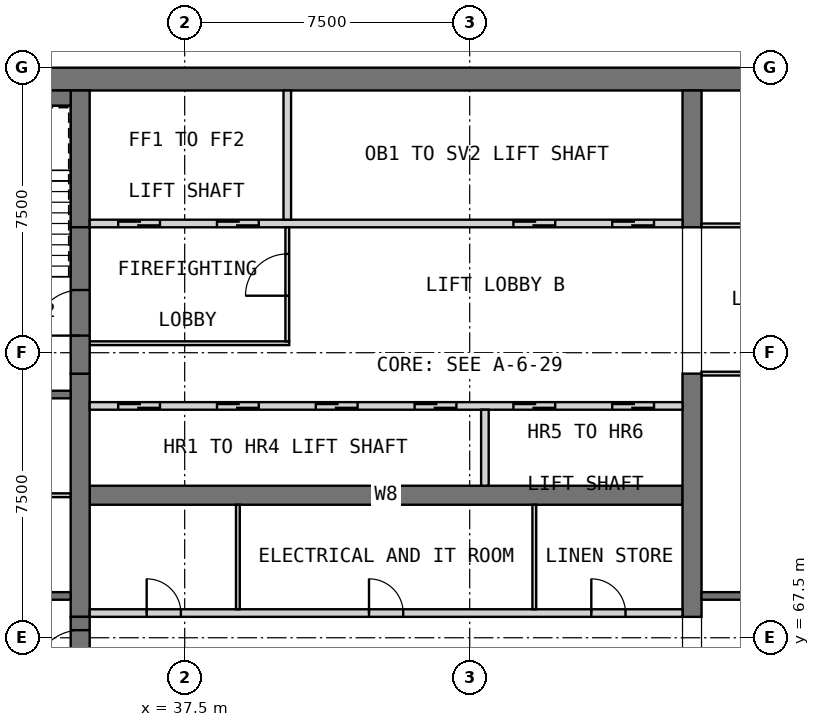
"""IFC4 building model, lengths in metres.
Left out: names, types, materials, properties, quantities, classifications, styles, units other than length and angle.
Written with IfcOpenShell. Run it as: python <this file> out.ifc"""

import sys

from ifc_helpers import new_model, si_unit, direction, frame, frame_2d, origin, place, context, subcontext, project, spatial, rectangle, extrude, element, fill, save


model = new_model("IFC4")
c1 = context("Model", 3, precision=1e-05, world=origin(), true_north=direction((0.0, 1.0)))
c2 = subcontext(c1, "Body", "Model", "MODEL_VIEW")
j1 = project(units=[si_unit("LENGTHUNIT", "METRE"), si_unit("PLANEANGLEUNIT", "RADIAN")], contexts=[c1])
p1 = place(None, origin())
s1 = spatial("IfcSite", under=j1, at=p1, CompositionType="ELEMENT")
p2 = place(p1, origin())
s2 = spatial("IfcBuilding", under=s1, at=p2, CompositionType="ELEMENT")
p3 = place(p2, frame((0.0, 0.0, 233.7)))
s3 = spatial("IfcBuildingStorey", under=s2, at=p3, CompositionType="ELEMENT", Elevation=233.7)
p4 = place(p3, frame((30.0, 82.2, 0.0), z_axis=(0.0, 0.0, 1.0), x_axis=(1.0, 0.0, 0.0)))
e1 = element("IfcWall", 1, at=p4, inside=s3, PredefinedType="SHEAR", context=c2, shape_type="SweptSolid", body=[
    extrude(rectangle(XDim=30.0, YDim=0.6, at=frame_2d((15.0, 0.0))), origin(), (0.0, 0.0, 1.0), 3.5),
])
p5 = place(p3, frame((35.0, 71.25, 0.0), z_axis=(0.0, 0.0, 1.0), x_axis=(1.0, 0.0, 0.0)))
e2 = element("IfcWall", 2, at=p5, inside=s3, PredefinedType="SHEAR", context=c2, shape_type="SweptSolid", body=[
    extrude(rectangle(XDim=15.6, YDim=0.5, at=frame_2d((7.8, 0.0))), origin(), (0.0, 0.0, 1.0), 3.5),
])
p6 = place(p3, frame((34.75, 68.05, 0.0), z_axis=(0.0, 0.0, 1.0), x_axis=(0.0, 1.0, 0.0)))
e3 = element("IfcWall", 3, at=p6, inside=s3, PredefinedType="SHEAR", context=c2, shape_type="SweptSolid", body=[
    extrude(rectangle(XDim=6.4, YDim=0.5, at=frame_2d((3.2, 0.0))), origin(), (0.0, 0.0, 1.0), 3.5),
])
p7 = place(p3, frame((34.75, 78.3, 0.0), z_axis=(0.0, 0.0, 1.0), x_axis=(0.0, 1.0, 0.0)))
e4 = element("IfcWall", 4, at=p7, inside=s3, PredefinedType="SHEAR", context=c2, shape_type="SweptSolid", body=[
    extrude(rectangle(XDim=3.6, YDim=0.5, at=frame_2d((1.8, 0.0))), origin(), (0.0, 0.0, 1.0), 3.5),
])
p8 = place(p3, frame((50.85, 68.05, 0.0), z_axis=(0.0, 0.0, 1.0), x_axis=(0.0, 1.0, 0.0)))
e5 = element("IfcWall", 5, at=p8, inside=s3, PredefinedType="SHEAR", context=c2, shape_type="SweptSolid", body=[
    extrude(rectangle(XDim=6.4, YDim=0.5, at=frame_2d((3.2, 0.0))), origin(), (0.0, 0.0, 1.0), 3.5),
])
p9 = place(p3, frame((50.85, 78.3, 0.0), z_axis=(0.0, 0.0, 1.0), x_axis=(0.0, 1.0, 0.0)))
e6 = element("IfcWall", 6, at=p9, inside=s3, PredefinedType="SHEAR", context=c2, shape_type="SweptSolid", body=[
    extrude(rectangle(XDim=3.6, YDim=0.5, at=frame_2d((1.8, 0.0))), origin(), (0.0, 0.0, 1.0), 3.5),
])
p10 = place(p3, frame((35.0, 68.15, 0.0), z_axis=(0.0, 0.0, 1.0), x_axis=(1.0, 0.0, 0.0)))
e7 = element("IfcWall", 7, at=p10, inside=s3, PredefinedType="PARTITIONING", context=c2, shape_type="SweptSolid", body=[
    extrude(rectangle(XDim=15.6, YDim=0.2, at=frame_2d((7.8, 0.0))), origin(), (0.0, 0.0, 1.0), 3.25),
])
p11 = place(p10, frame((1.5, 0.0, 0.0)))
e8 = element("IfcOpeningElement", 8, at=p11, cuts=e7, PredefinedType="OPENING", context=c2, shape_type="SweptSolid", body=[
    extrude(rectangle(XDim=0.9, YDim=2.1, at=frame_2d((0.45, 1.05))), frame((0.0, 0.11, 0.0), z_axis=(0.0, -1.0, 0.0), x_axis=(1.0, 0.0, 0.0)), (0.0, 0.0, 1.0), 0.22),
])
p12 = place(p10, frame((7.35, 0.0, 0.0)))
e9 = element("IfcOpeningElement", 9, at=p12, cuts=e7, PredefinedType="OPENING", context=c2, shape_type="SweptSolid", body=[
    extrude(rectangle(XDim=0.9, YDim=2.1, at=frame_2d((0.45, 1.05))), frame((0.0, 0.11, 0.0), z_axis=(0.0, -1.0, 0.0), x_axis=(1.0, 0.0, 0.0)), (0.0, 0.0, 1.0), 0.22),
])
p13 = place(p10, frame((13.2, 0.0, 0.0)))
e10 = element("IfcOpeningElement", 10, at=p13, cuts=e7, PredefinedType="OPENING", context=c2, shape_type="SweptSolid", body=[
    extrude(rectangle(XDim=0.9, YDim=2.1, at=frame_2d((0.45, 1.05))), frame((0.0, 0.11, 0.0), z_axis=(0.0, -1.0, 0.0), x_axis=(1.0, 0.0, 0.0)), (0.0, 0.0, 1.0), 0.22),
])
for number, where, z_axis, x_axis in (
    (11, (38.9, 68.25, 0.0), (0.0, 0.0, 1.0), (0.0, 1.0, 0.0)),
    (12, (46.7, 68.25, 0.0), (0.0, 0.0, 1.0), (0.0, 1.0, 0.0)),
):
    element("IfcWall", number, at=place(p3, frame(where, z_axis=z_axis, x_axis=x_axis)), inside=s3, PredefinedType="PARTITIONING", context=c2, shape_type="SweptSolid", body=[
        extrude(rectangle(XDim=2.75, YDim=0.1, at=frame_2d((1.375, 0.0))), origin(), (0.0, 0.0, 1.0), 3.25),
    ])
p14 = place(p3, frame((35.0, 73.6, 0.0), z_axis=(0.0, 0.0, 1.0), x_axis=(1.0, 0.0, 0.0)))
e13 = element("IfcWall", 13, at=p14, inside=s3, PredefinedType="SOLIDWALL", context=c2, shape_type="SweptSolid", body=[
    extrude(rectangle(XDim=15.6, YDim=0.2, at=frame_2d((7.8, 0.0))), origin(), (0.0, 0.0, 1.0), 3.5),
])
p15 = place(p14, frame((0.75, 0.0, 0.0)))
e14 = element("IfcOpeningElement", 14, at=p15, cuts=e13, PredefinedType="OPENING", context=c2, shape_type="SweptSolid", body=[
    extrude(rectangle(XDim=1.1, YDim=2.1, at=frame_2d((0.55, 1.05))), frame((0.0, 0.11, 0.0), z_axis=(0.0, -1.0, 0.0), x_axis=(1.0, 0.0, 0.0)), (0.0, 0.0, 1.0), 0.22),
])
p16 = place(p14, frame((3.35, 0.0, 0.0)))
e15 = element("IfcOpeningElement", 15, at=p16, cuts=e13, PredefinedType="OPENING", context=c2, shape_type="SweptSolid", body=[
    extrude(rectangle(XDim=1.1, YDim=2.1, at=frame_2d((0.55, 1.05))), frame((0.0, 0.11, 0.0), z_axis=(0.0, -1.0, 0.0), x_axis=(1.0, 0.0, 0.0)), (0.0, 0.0, 1.0), 0.22),
])
p17 = place(p14, frame((5.95, 0.0, 0.0)))
e16 = element("IfcOpeningElement", 16, at=p17, cuts=e13, PredefinedType="OPENING", context=c2, shape_type="SweptSolid", body=[
    extrude(rectangle(XDim=1.1, YDim=2.1, at=frame_2d((0.55, 1.05))), frame((0.0, 0.11, 0.0), z_axis=(0.0, -1.0, 0.0), x_axis=(1.0, 0.0, 0.0)), (0.0, 0.0, 1.0), 0.22),
])
p18 = place(p14, frame((8.55, 0.0, 0.0)))
e17 = element("IfcOpeningElement", 17, at=p18, cuts=e13, PredefinedType="OPENING", context=c2, shape_type="SweptSolid", body=[
    extrude(rectangle(XDim=1.1, YDim=2.1, at=frame_2d((0.55, 1.05))), frame((0.0, 0.11, 0.0), z_axis=(0.0, -1.0, 0.0), x_axis=(1.0, 0.0, 0.0)), (0.0, 0.0, 1.0), 0.22),
])
p19 = place(p14, frame((11.15, 0.0, 0.0)))
e18 = element("IfcOpeningElement", 18, at=p19, cuts=e13, PredefinedType="OPENING", context=c2, shape_type="SweptSolid", body=[
    extrude(rectangle(XDim=1.1, YDim=2.1, at=frame_2d((0.55, 1.05))), frame((0.0, 0.11, 0.0), z_axis=(0.0, -1.0, 0.0), x_axis=(1.0, 0.0, 0.0)), (0.0, 0.0, 1.0), 0.22),
])
p20 = place(p14, frame((13.75, 0.0, 0.0)))
e19 = element("IfcOpeningElement", 19, at=p20, cuts=e13, PredefinedType="OPENING", context=c2, shape_type="SweptSolid", body=[
    extrude(rectangle(XDim=1.1, YDim=2.1, at=frame_2d((0.55, 1.05))), frame((0.0, 0.11, 0.0), z_axis=(0.0, -1.0, 0.0), x_axis=(1.0, 0.0, 0.0)), (0.0, 0.0, 1.0), 0.22),
])
p21 = place(p3, frame((45.4, 71.5, 0.0), z_axis=(0.0, 0.0, 1.0), x_axis=(0.0, 1.0, 0.0)))
e20 = element("IfcWall", 20, at=p21, inside=s3, PredefinedType="SOLIDWALL", context=c2, shape_type="SweptSolid", body=[
    extrude(rectangle(XDim=2.0, YDim=0.2, at=frame_2d((1.0, 0.0))), origin(), (0.0, 0.0, 1.0), 3.5),
])
p22 = place(p3, frame((35.0, 78.4, 0.0), z_axis=(0.0, 0.0, 1.0), x_axis=(1.0, 0.0, 0.0)))
e21 = element("IfcWall", 21, at=p22, inside=s3, PredefinedType="SOLIDWALL", context=c2, shape_type="SweptSolid", body=[
    extrude(rectangle(XDim=15.6, YDim=0.2, at=frame_2d((7.8, 0.0))), origin(), (0.0, 0.0, 1.0), 3.5),
])
p23 = place(p22, frame((0.75, 0.0, 0.0)))
e22 = element("IfcOpeningElement", 22, at=p23, cuts=e21, PredefinedType="OPENING", context=c2, shape_type="SweptSolid", body=[
    extrude(rectangle(XDim=1.1, YDim=2.1, at=frame_2d((0.55, 1.05))), frame((0.0, 0.11, 0.0), z_axis=(0.0, -1.0, 0.0), x_axis=(1.0, 0.0, 0.0)), (0.0, 0.0, 1.0), 0.22),
])
p24 = place(p22, frame((3.35, 0.0, 0.0)))
e23 = element("IfcOpeningElement", 23, at=p24, cuts=e21, PredefinedType="OPENING", context=c2, shape_type="SweptSolid", body=[
    extrude(rectangle(XDim=1.1, YDim=2.1, at=frame_2d((0.55, 1.05))), frame((0.0, 0.11, 0.0), z_axis=(0.0, -1.0, 0.0), x_axis=(1.0, 0.0, 0.0)), (0.0, 0.0, 1.0), 0.22),
])
p25 = place(p22, frame((11.15, 0.0, 0.0)))
e24 = element("IfcOpeningElement", 24, at=p25, cuts=e21, PredefinedType="OPENING", context=c2, shape_type="SweptSolid", body=[
    extrude(rectangle(XDim=1.1, YDim=2.1, at=frame_2d((0.55, 1.05))), frame((0.0, 0.11, 0.0), z_axis=(0.0, -1.0, 0.0), x_axis=(1.0, 0.0, 0.0)), (0.0, 0.0, 1.0), 0.22),
])
p26 = place(p22, frame((13.75, 0.0, 0.0)))
e25 = element("IfcOpeningElement", 25, at=p26, cuts=e21, PredefinedType="OPENING", context=c2, shape_type="SweptSolid", body=[
    extrude(rectangle(XDim=1.1, YDim=2.1, at=frame_2d((0.55, 1.05))), frame((0.0, 0.11, 0.0), z_axis=(0.0, -1.0, 0.0), x_axis=(1.0, 0.0, 0.0)), (0.0, 0.0, 1.0), 0.22),
])
p27 = place(p3, frame((40.2, 78.5, 0.0), z_axis=(0.0, 0.0, 1.0), x_axis=(0.0, 1.0, 0.0)))
e26 = element("IfcWall", 26, at=p27, inside=s3, PredefinedType="SOLIDWALL", context=c2, shape_type="SweptSolid", body=[
    extrude(rectangle(XDim=3.4, YDim=0.2, at=frame_2d((1.7, 0.0))), origin(), (0.0, 0.0, 1.0), 3.5),
])
p28 = place(p3, frame((35.0, 75.25, 0.0), z_axis=(0.0, 0.0, 1.0), x_axis=(1.0, 0.0, 0.0)))
e27 = element("IfcWall", 27, at=p28, inside=s3, PredefinedType="PARTITIONING", context=c2, shape_type="SweptSolid", body=[
    extrude(rectangle(XDim=5.25, YDim=0.1, at=frame_2d((2.625, 0.0))), origin(), (0.0, 0.0, 1.0), 3.25),
])
p29 = place(p3, frame((40.2, 75.3, 0.0), z_axis=(0.0, 0.0, 1.0), x_axis=(0.0, 1.0, 0.0)))
e28 = element("IfcWall", 28, at=p29, inside=s3, PredefinedType="PARTITIONING", context=c2, shape_type="SweptSolid", body=[
    extrude(rectangle(XDim=3.0, YDim=0.1, at=frame_2d((1.5, 0.0))), origin(), (0.0, 0.0, 1.0), 3.25),
])
p30 = place(p29, frame((1.2, 0.0, 0.0)))
e29 = element("IfcOpeningElement", 29, at=p30, cuts=e28, PredefinedType="OPENING", context=c2, shape_type="SweptSolid", body=[
    extrude(rectangle(XDim=1.1, YDim=2.1, at=frame_2d((0.55, 1.05))), frame((0.0, 0.06, 0.0), z_axis=(0.0, -1.0, 0.0), x_axis=(1.0, 0.0, 0.0)), (0.0, 0.0, 1.0), 0.12),
])
p31 = place(p3, frame((34.75, 64.2, 0.0), z_axis=(0.0, 0.0, 1.0), x_axis=(0.0, 1.0, 0.0)))
e30 = element("IfcWall", 30, at=p31, inside=s3, PredefinedType="SOLIDWALL", context=c2, shape_type="SweptSolid", body=[
    extrude(rectangle(XDim=3.85, YDim=0.5, at=frame_2d((1.925, 0.0))), origin(), (0.0, 0.0, 1.0), 2.3),
])
p32 = place(p31, frame((2.3, 0.0, 0.0)))
e31 = element("IfcOpeningElement", 31, at=p32, cuts=e30, PredefinedType="OPENING", context=c2, shape_type="SweptSolid", body=[
    extrude(rectangle(XDim=1.2, YDim=2.1, at=frame_2d((0.6, 1.05))), frame((0.0, 0.26, 0.0), z_axis=(0.0, -1.0, 0.0), x_axis=(1.0, 0.0, 0.0)), (0.0, 0.0, 1.0), 0.52),
])
p33 = place(p3, frame((34.75, 74.45, 0.0), z_axis=(0.0, 0.0, 1.0), x_axis=(0.0, 1.0, 0.0)))
e32 = element("IfcWall", 32, at=p33, inside=s3, PredefinedType="SOLIDWALL", context=c2, shape_type="SweptSolid", body=[
    extrude(rectangle(XDim=3.85, YDim=0.5, at=frame_2d((1.925, 0.0))), origin(), (0.0, 0.0, 1.0), 2.3),
])
p34 = place(p33, frame((1.0, 0.0, 0.0)))
e33 = element("IfcOpeningElement", 33, at=p34, cuts=e32, PredefinedType="OPENING", context=c2, shape_type="SweptSolid", body=[
    extrude(rectangle(XDim=1.2, YDim=2.1, at=frame_2d((0.6, 1.05))), frame((0.0, 0.26, 0.0), z_axis=(0.0, -1.0, 0.0), x_axis=(1.0, 0.0, 0.0)), (0.0, 0.0, 1.0), 0.52),
])
p35 = place(p3, frame((30.6, 68.6, 0.0), z_axis=(0.0, 0.0, 1.0), x_axis=(1.0, 0.0, 0.0)))
e34 = element("IfcWall", 34, at=p35, inside=s3, PredefinedType="SOLIDWALL", context=c2, shape_type="SweptSolid", body=[
    extrude(rectangle(XDim=3.9, YDim=0.2, at=frame_2d((1.95, 0.0))), origin(), (0.0, 0.0, 1.0), 3.25),
])
p36 = place(p35, frame((1.7, 0.0, 0.0)))
e35 = element("IfcOpeningElement", 35, at=p36, cuts=e34, PredefinedType="OPENING", context=c2, shape_type="SweptSolid", body=[
    extrude(rectangle(XDim=0.9, YDim=2.1, at=frame_2d((0.45, 1.05))), frame((0.0, 0.11, 0.0), z_axis=(0.0, -1.0, 0.0), x_axis=(1.0, 0.0, 0.0)), (0.0, 0.0, 1.0), 0.22),
])
p37 = place(p3, frame((30.6, 73.9, 0.0), z_axis=(0.0, 0.0, 1.0), x_axis=(1.0, 0.0, 0.0)))
e36 = element("IfcWall", 36, at=p37, inside=s3, PredefinedType="SOLIDWALL", context=c2, shape_type="SweptSolid", body=[
    extrude(rectangle(XDim=3.9, YDim=0.2, at=frame_2d((1.95, 0.0))), origin(), (0.0, 0.0, 1.0), 3.25),
])
p38 = place(p37, frame((1.7, 0.0, 0.0)))
e37 = element("IfcOpeningElement", 37, at=p38, cuts=e36, PredefinedType="OPENING", context=c2, shape_type="SweptSolid", body=[
    extrude(rectangle(XDim=0.9, YDim=2.1, at=frame_2d((0.45, 1.05))), frame((0.0, 0.11, 0.0), z_axis=(0.0, -1.0, 0.0), x_axis=(1.0, 0.0, 0.0)), (0.0, 0.0, 1.0), 0.22),
])
p39 = place(p3, frame((51.1, 68.6, 0.0), z_axis=(0.0, 0.0, 1.0), x_axis=(1.0, 0.0, 0.0)))
e38 = element("IfcWall", 38, at=p39, inside=s3, PredefinedType="SOLIDWALL", context=c2, shape_type="SweptSolid", body=[
    extrude(rectangle(XDim=8.3, YDim=0.2, at=frame_2d((4.15, 0.0))), origin(), (0.0, 0.0, 1.0), 3.25),
])
p40 = place(p3, frame((31.0, 81.7, 0.0), z_axis=(0.0, 0.0, 1.0), x_axis=(1.0, 0.0, 0.0)))
e39 = element("IfcWall", 39, at=p40, inside=s3, PredefinedType="SOLIDWALL", context=c2, shape_type="SweptSolid", body=[
    extrude(rectangle(XDim=3.5, YDim=0.4, at=frame_2d((1.75, 0.0))), origin(), (0.0, 0.0, 1.0), 3.25),
])
p41 = place(p3, frame((30.6, 71.25, 0.0), z_axis=(0.0, 0.0, 1.0), x_axis=(1.0, 0.0, 0.0)))
e40 = element("IfcWall", 40, at=p41, inside=s3, PredefinedType="PARTITIONING", context=c2, shape_type="SweptSolid", body=[
    extrude(rectangle(XDim=3.9, YDim=0.1, at=frame_2d((1.95, 0.0))), origin(), (0.0, 0.0, 1.0), 3.25),
])
p42 = place(p3, frame((51.1, 74.45, 0.0), z_axis=(0.0, 0.0, 1.0), x_axis=(1.0, 0.0, 0.0)))
e41 = element("IfcWall", 41, at=p42, inside=s3, PredefinedType="PARTITIONING", context=c2, shape_type="SweptSolid", body=[
    extrude(rectangle(XDim=8.3, YDim=0.1, at=frame_2d((4.15, 0.0))), origin(), (0.0, 0.0, 1.0), 3.25),
])
p43 = place(p42, frame((3.7, 0.0, 0.0)))
e42 = element("IfcOpeningElement", 42, at=p43, cuts=e41, PredefinedType="OPENING", context=c2, shape_type="SweptSolid", body=[
    extrude(rectangle(XDim=0.9, YDim=2.1, at=frame_2d((0.45, 1.05))), frame((0.0, 0.06, 0.0), z_axis=(0.0, -1.0, 0.0), x_axis=(1.0, 0.0, 0.0)), (0.0, 0.0, 1.0), 0.12),
])
p44 = place(p3, frame((51.1, 78.35, 0.0), z_axis=(0.0, 0.0, 1.0), x_axis=(1.0, 0.0, 0.0)))
e43 = element("IfcWall", 43, at=p44, inside=s3, PredefinedType="PARTITIONING", context=c2, shape_type="SweptSolid", body=[
    extrude(rectangle(XDim=8.3, YDim=0.1, at=frame_2d((4.15, 0.0))), origin(), (0.0, 0.0, 1.0), 3.25),
])
p45 = place(p44, frame((3.7, 0.0, 0.0)))
e44 = element("IfcOpeningElement", 44, at=p45, cuts=e43, PredefinedType="OPENING", context=c2, shape_type="SweptSolid", body=[
    extrude(rectangle(XDim=0.9, YDim=2.1, at=frame_2d((0.45, 1.05))), frame((0.0, 0.06, 0.0), z_axis=(0.0, -1.0, 0.0), x_axis=(1.0, 0.0, 0.0)), (0.0, 0.0, 1.0), 0.12),
])
p46 = place(p11, origin())
e45 = element("IfcDoor", 45, at=p46, inside=s3, OperationType="SINGLE_SWING_RIGHT", PredefinedType="DOOR", context=c2, shape_type="SweptSolid", body=[
    extrude(rectangle(XDim=0.9, YDim=2.1, at=frame_2d((0.45, 1.05))), frame((0.0, 0.025, 0.0), z_axis=(0.0, -1.0, 0.0), x_axis=(1.0, 0.0, 0.0)), (0.0, 0.0, 1.0), 0.05),
])
fill(e8, e45)
p47 = place(p12, origin())
e46 = element("IfcDoor", 46, at=p47, inside=s3, OperationType="SINGLE_SWING_LEFT", PredefinedType="DOOR", context=c2, shape_type="SweptSolid", body=[
    extrude(rectangle(XDim=0.9, YDim=2.1, at=frame_2d((0.45, 1.05))), frame((0.0, 0.025, 0.0), z_axis=(0.0, -1.0, 0.0), x_axis=(1.0, 0.0, 0.0)), (0.0, 0.0, 1.0), 0.05),
])
fill(e9, e46)
p48 = place(p13, origin())
e47 = element("IfcDoor", 47, at=p48, inside=s3, OperationType="SINGLE_SWING_RIGHT", PredefinedType="DOOR", context=c2, shape_type="SweptSolid", body=[
    extrude(rectangle(XDim=0.9, YDim=2.1, at=frame_2d((0.45, 1.05))), frame((0.0, 0.025, 0.0), z_axis=(0.0, -1.0, 0.0), x_axis=(1.0, 0.0, 0.0)), (0.0, 0.0, 1.0), 0.05),
])
fill(e10, e47)
p49 = place(p15, origin())
e48 = element("IfcDoor", 48, at=p49, inside=s3, OperationType="DOUBLE_DOOR_SLIDING", PredefinedType="DOOR", context=c2, shape_type="SweptSolid", body=[
    extrude(rectangle(XDim=1.1, YDim=2.1, at=frame_2d((0.55, 1.05))), frame((0.0, 0.025, 0.0), z_axis=(0.0, -1.0, 0.0), x_axis=(1.0, 0.0, 0.0)), (0.0, 0.0, 1.0), 0.05),
])
fill(e14, e48)
p50 = place(p16, origin())
e49 = element("IfcDoor", 49, at=p50, inside=s3, OperationType="DOUBLE_DOOR_SLIDING", PredefinedType="DOOR", context=c2, shape_type="SweptSolid", body=[
    extrude(rectangle(XDim=1.1, YDim=2.1, at=frame_2d((0.55, 1.05))), frame((0.0, 0.025, 0.0), z_axis=(0.0, -1.0, 0.0), x_axis=(1.0, 0.0, 0.0)), (0.0, 0.0, 1.0), 0.05),
])
fill(e15, e49)
p51 = place(p17, origin())
e50 = element("IfcDoor", 50, at=p51, inside=s3, OperationType="DOUBLE_DOOR_SLIDING", PredefinedType="DOOR", context=c2, shape_type="SweptSolid", body=[
    extrude(rectangle(XDim=1.1, YDim=2.1, at=frame_2d((0.55, 1.05))), frame((0.0, 0.025, 0.0), z_axis=(0.0, -1.0, 0.0), x_axis=(1.0, 0.0, 0.0)), (0.0, 0.0, 1.0), 0.05),
])
fill(e16, e50)
p52 = place(p18, origin())
e51 = element("IfcDoor", 51, at=p52, inside=s3, OperationType="DOUBLE_DOOR_SLIDING", PredefinedType="DOOR", context=c2, shape_type="SweptSolid", body=[
    extrude(rectangle(XDim=1.1, YDim=2.1, at=frame_2d((0.55, 1.05))), frame((0.0, 0.025, 0.0), z_axis=(0.0, -1.0, 0.0), x_axis=(1.0, 0.0, 0.0)), (0.0, 0.0, 1.0), 0.05),
])
fill(e17, e51)
p53 = place(p19, origin())
e52 = element("IfcDoor", 52, at=p53, inside=s3, OperationType="DOUBLE_DOOR_SLIDING", PredefinedType="DOOR", context=c2, shape_type="SweptSolid", body=[
    extrude(rectangle(XDim=1.1, YDim=2.1, at=frame_2d((0.55, 1.05))), frame((0.0, 0.025, 0.0), z_axis=(0.0, -1.0, 0.0), x_axis=(1.0, 0.0, 0.0)), (0.0, 0.0, 1.0), 0.05),
])
fill(e18, e52)
p54 = place(p20, origin())
e53 = element("IfcDoor", 53, at=p54, inside=s3, OperationType="DOUBLE_DOOR_SLIDING", PredefinedType="DOOR", context=c2, shape_type="SweptSolid", body=[
    extrude(rectangle(XDim=1.1, YDim=2.1, at=frame_2d((0.55, 1.05))), frame((0.0, 0.025, 0.0), z_axis=(0.0, -1.0, 0.0), x_axis=(1.0, 0.0, 0.0)), (0.0, 0.0, 1.0), 0.05),
])
fill(e19, e53)
p55 = place(p23, origin())
e54 = element("IfcDoor", 54, at=p55, inside=s3, OperationType="DOUBLE_DOOR_SLIDING", PredefinedType="DOOR", context=c2, shape_type="SweptSolid", body=[
    extrude(rectangle(XDim=1.1, YDim=2.1, at=frame_2d((0.55, 1.05))), frame((0.0, 0.025, 0.0), z_axis=(0.0, -1.0, 0.0), x_axis=(1.0, 0.0, 0.0)), (0.0, 0.0, 1.0), 0.05),
])
fill(e22, e54)
p56 = place(p24, origin())
e55 = element("IfcDoor", 55, at=p56, inside=s3, OperationType="DOUBLE_DOOR_SLIDING", PredefinedType="DOOR", context=c2, shape_type="SweptSolid", body=[
    extrude(rectangle(XDim=1.1, YDim=2.1, at=frame_2d((0.55, 1.05))), frame((0.0, 0.025, 0.0), z_axis=(0.0, -1.0, 0.0), x_axis=(1.0, 0.0, 0.0)), (0.0, 0.0, 1.0), 0.05),
])
fill(e23, e55)
p57 = place(p25, origin())
e56 = element("IfcDoor", 56, at=p57, inside=s3, OperationType="DOUBLE_DOOR_SLIDING", PredefinedType="DOOR", context=c2, shape_type="SweptSolid", body=[
    extrude(rectangle(XDim=1.1, YDim=2.1, at=frame_2d((0.55, 1.05))), frame((0.0, 0.025, 0.0), z_axis=(0.0, -1.0, 0.0), x_axis=(1.0, 0.0, 0.0)), (0.0, 0.0, 1.0), 0.05),
])
fill(e24, e56)
p58 = place(p26, origin())
e57 = element("IfcDoor", 57, at=p58, inside=s3, OperationType="DOUBLE_DOOR_SLIDING", PredefinedType="DOOR", context=c2, shape_type="SweptSolid", body=[
    extrude(rectangle(XDim=1.1, YDim=2.1, at=frame_2d((0.55, 1.05))), frame((0.0, 0.025, 0.0), z_axis=(0.0, -1.0, 0.0), x_axis=(1.0, 0.0, 0.0)), (0.0, 0.0, 1.0), 0.05),
])
fill(e25, e57)
p59 = place(p30, origin())
e58 = element("IfcDoor", 58, at=p59, inside=s3, OperationType="SINGLE_SWING_LEFT", PredefinedType="DOOR", context=c2, shape_type="SweptSolid", body=[
    extrude(rectangle(XDim=1.1, YDim=2.1, at=frame_2d((0.55, 1.05))), frame((0.0, 0.025, 0.0), z_axis=(0.0, -1.0, 0.0), x_axis=(1.0, 0.0, 0.0)), (0.0, 0.0, 1.0), 0.05),
])
fill(e29, e58)
p60 = place(p32, origin())
e59 = element("IfcDoor", 59, at=p60, inside=s3, OperationType="SINGLE_SWING_LEFT", PredefinedType="DOOR", context=c2, shape_type="SweptSolid", body=[
    extrude(rectangle(XDim=1.2, YDim=2.1, at=frame_2d((0.6, 1.05))), frame((0.0, 0.025, 0.0), z_axis=(0.0, -1.0, 0.0), x_axis=(1.0, 0.0, 0.0)), (0.0, 0.0, 1.0), 0.05),
])
fill(e31, e59)
p61 = place(p34, origin())
e60 = element("IfcDoor", 60, at=p61, inside=s3, OperationType="SINGLE_SWING_RIGHT", PredefinedType="DOOR", context=c2, shape_type="SweptSolid", body=[
    extrude(rectangle(XDim=1.2, YDim=2.1, at=frame_2d((0.6, 1.05))), frame((0.0, 0.025, 0.0), z_axis=(0.0, -1.0, 0.0), x_axis=(1.0, 0.0, 0.0)), (0.0, 0.0, 1.0), 0.05),
])
fill(e33, e60)
save(model, sys.argv[1])
